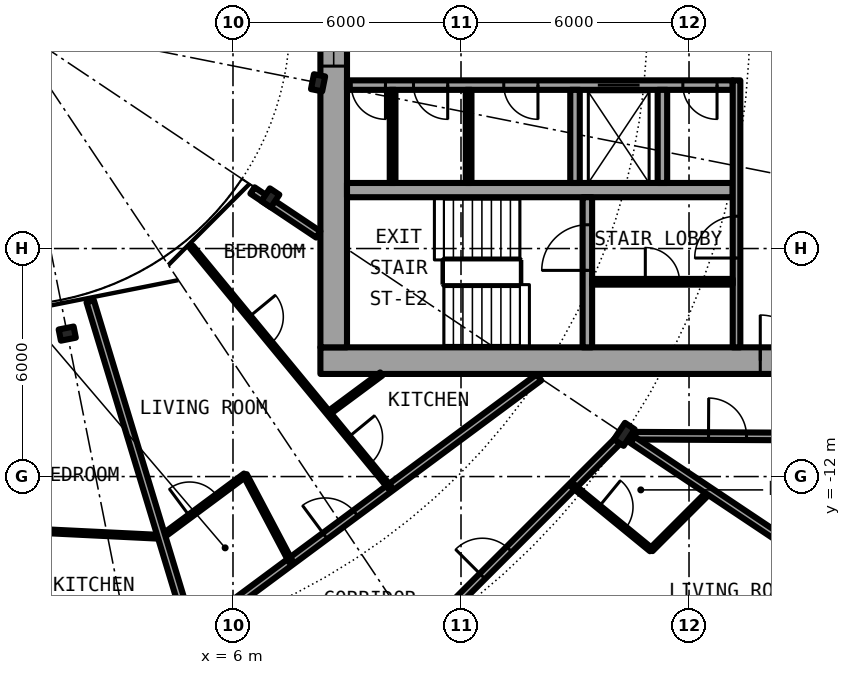
"""IFC4 building model, lengths in metres.
Left out: names, types, materials, properties, quantities, classifications, styles, units other than length and angle.
Written with IfcOpenShell. Run it as: python <this file> out.ifc"""

import sys

from ifc_helpers import new_model, si_unit, direction, frame, frame_2d, origin, origin_2d, place, context, subcontext, project, spatial, rectangle, i_section, extrude, element, fill, save


model = new_model("IFC4")
c1 = context("Model", 3, precision=1e-05, world=origin(), true_north=direction((0.0, 1.0)))
c2 = subcontext(c1, "Body", "Model", "MODEL_VIEW")
j1 = project(units=[si_unit("LENGTHUNIT", "METRE"), si_unit("PLANEANGLEUNIT", "RADIAN")], contexts=[c1])
p1 = place(None, origin())
s1 = spatial("IfcSite", under=j1, at=p1, CompositionType="ELEMENT")
p2 = place(p1, origin())
s2 = spatial("IfcBuilding", under=s1, at=p2, CompositionType="ELEMENT")
p3 = place(p2, frame((0.0, 0.0, 72.75)))
s3 = spatial("IfcBuildingStorey", under=s2, at=p3, CompositionType="ELEMENT", Elevation=72.75)
p4 = place(p3, frame((16.297, -10.889, 0.0), z_axis=(0.0, 0.0, 1.0), x_axis=(0.831469612303, -0.55557023302, 0.0)))
e1 = element("IfcColumn", 1, at=p4, inside=s3, PredefinedType="COLUMN", context=c2, shape_type="SweptSolid", body=[
    extrude(i_section(OverallWidth=0.306, OverallDepth=0.524, WebThickness=0.021, FlangeThickness=0.04, FilletRadius=0.027, at=origin_2d()), origin(), (0.0, 0.0, 1.0), 3.05),
])
for number, where, z_axis, x_axis in (
    (2, (1.639, -8.239, 0.0), (0.0, 0.0, 1.0), (0.195, -0.981, 0.0)),
    (3, (6.984, -4.667, 0.0), (0.0, 0.0, 1.0), (0.831, -0.556, 0.0)),
    (4, (8.239, -1.639, 0.0), (0.0, 0.0, 1.0), (0.981, -0.195, 0.0)),
):
    element("IfcColumn", number, at=place(p3, frame(where, z_axis=z_axis, x_axis=x_axis)), inside=s3, PredefinedType="COLUMN", context=c2, shape_type="SweptSolid", body=[
        extrude(i_section(OverallWidth=0.3, OverallDepth=0.4, WebThickness=0.013, FlangeThickness=0.024, FilletRadius=0.027, at=origin_2d()), origin(), (0.0, 0.0, 1.0), 3.05),
    ])
p5 = place(p3, frame((19.304, -19.304, 0.0), z_axis=(0.0, 0.0, 1.0), x_axis=(0.634382322723, 0.773019449054, 0.0)))
e5 = element("IfcWall", 5, at=p5, inside=s3, PredefinedType="SOLIDWALL", context=c2, shape_type="SweptSolid", body=[
    extrude(rectangle(XDim=5.352, YDim=0.25, at=frame_2d((2.676, 0.0))), origin(), (0.0, 0.0, 1.0), 2.7),
])
p6 = place(p5, frame((0.441, 0.0, 0.3)))
e6 = element("IfcOpeningElement", 6, at=p6, cuts=e5, PredefinedType="OPENING", context=c2, shape_type="SweptSolid", body=[
    extrude(rectangle(XDim=1.8, YDim=2.1, at=frame_2d((0.9, 1.05))), frame((0.0, 0.135, 0.0), z_axis=(0.0, -1.0, 0.0), x_axis=(1.0, 0.0, 0.0)), (0.0, 0.0, 1.0), 0.27),
])
p7 = place(p5, frame((3.51, 0.0, 0.0)))
e7 = element("IfcOpeningElement", 7, at=p7, cuts=e5, PredefinedType="OPENING", context=c2, shape_type="SweptSolid", body=[
    extrude(rectangle(XDim=1.0, YDim=2.2, at=frame_2d((0.5, 1.1))), frame((0.0, 0.135, 0.0), z_axis=(0.0, -1.0, 0.0), x_axis=(1.0, 0.0, 0.0)), (0.0, 0.0, 1.0), 0.27),
])
p8 = place(p3, frame((8.3, -8.95, 0.0), z_axis=(0.0, 0.0, 1.0), x_axis=(1.0, 0.0, 0.0)))
e8 = element("IfcWall", 8, at=p8, inside=s3, PredefinedType="SHEAR", context=c2, shape_type="SweptSolid", body=[
    extrude(rectangle(XDim=14.0, YDim=0.7, at=frame_2d((7.0, 0.0))), origin(), (0.0, 0.0, 1.0), 3.05),
])
p9 = place(p8, frame((11.575, 0.0, 0.0)))
e9 = element("IfcOpeningElement", 9, at=p9, cuts=e8, PredefinedType="OPENING", context=c2, shape_type="SweptSolid", body=[
    extrude(rectangle(XDim=1.2, YDim=2.3, at=frame_2d((0.6, 1.15))), frame((0.0, 0.36, 0.0), z_axis=(0.0, -1.0, 0.0), x_axis=(1.0, 0.0, 0.0)), (0.0, 0.0, 1.0), 0.72),
])
p10 = place(p3, frame((8.65, -8.6, 0.0), z_axis=(0.0, 0.0, 1.0), x_axis=(0.0, 1.0, 0.0)))
e10 = element("IfcWall", 10, at=p10, inside=s3, PredefinedType="SHEAR", context=c2, shape_type="SweptSolid", body=[
    extrude(rectangle(XDim=17.2, YDim=0.7, at=frame_2d((8.6, 0.0))), origin(), (0.0, 0.0, 1.0), 3.05),
])
p11 = place(p10, frame((7.4, 0.0, 0.1)))
e11 = element("IfcOpeningElement", 11, at=p11, cuts=e10, PredefinedType="OPENING", context=c2, shape_type="SweptSolid", body=[
    extrude(rectangle(XDim=2.4, YDim=2.2, at=frame_2d((1.2, 1.1))), frame((0.0, 0.36, 0.0), z_axis=(0.0, -1.0, 0.0), x_axis=(1.0, 0.0, 0.0)), (0.0, 0.0, 1.0), 0.72),
])
p12 = place(p3, frame((19.15, -1.7, 0.0), z_axis=(0.0, 0.0, 1.0), x_axis=(-1.0, 0.0, 0.0)))
e12 = element("IfcWall", 12, at=p12, inside=s3, PredefinedType="SHEAR", context=c2, shape_type="SweptSolid", body=[
    extrude(rectangle(XDim=10.15, YDim=0.25, at=frame_2d((5.075, 0.0))), origin(), (0.0, 0.0, 1.0), 3.05),
])
p13 = place(p12, frame((2.45, 0.0, 0.0)))
e13 = element("IfcOpeningElement", 13, at=p13, cuts=e12, PredefinedType="OPENING", context=c2, shape_type="SweptSolid", body=[
    extrude(rectangle(XDim=1.1, YDim=2.3, at=frame_2d((0.55, 1.15))), frame((0.0, 0.135, 0.0), z_axis=(0.0, -1.0, 0.0), x_axis=(1.0, 0.0, 0.0)), (0.0, 0.0, 1.0), 0.27),
])
p14 = place(p12, frame((9.137, 0.0, 0.0)))
e14 = element("IfcOpeningElement", 14, at=p14, cuts=e12, PredefinedType="OPENING", context=c2, shape_type="SweptSolid", body=[
    extrude(rectangle(XDim=0.9, YDim=2.3, at=frame_2d((0.45, 1.15))), frame((0.0, 0.135, 0.0), z_axis=(0.0, -1.0, 0.0), x_axis=(1.0, 0.0, 0.0)), (0.0, 0.0, 1.0), 0.27),
])
p15 = place(p12, frame((7.5, 0.0, 0.0)))
e15 = element("IfcOpeningElement", 15, at=p15, cuts=e12, PredefinedType="OPENING", context=c2, shape_type="SweptSolid", body=[
    extrude(rectangle(XDim=0.9, YDim=2.3, at=frame_2d((0.45, 1.15))), frame((0.0, 0.135, 0.0), z_axis=(0.0, -1.0, 0.0), x_axis=(1.0, 0.0, 0.0)), (0.0, 0.0, 1.0), 0.27),
])
p16 = place(p12, frame((5.125, 0.0, 0.0)))
e16 = element("IfcOpeningElement", 16, at=p16, cuts=e12, PredefinedType="OPENING", context=c2, shape_type="SweptSolid", body=[
    extrude(rectangle(XDim=0.9, YDim=2.3, at=frame_2d((0.45, 1.15))), frame((0.0, 0.135, 0.0), z_axis=(0.0, -1.0, 0.0), x_axis=(1.0, 0.0, 0.0)), (0.0, 0.0, 1.0), 0.27),
])
p17 = place(p12, frame((0.413, 0.0, 0.0)))
e17 = element("IfcOpeningElement", 17, at=p17, cuts=e12, PredefinedType="OPENING", context=c2, shape_type="SweptSolid", body=[
    extrude(rectangle(XDim=0.9, YDim=2.3, at=frame_2d((0.45, 1.15))), frame((0.0, 0.135, 0.0), z_axis=(0.0, -1.0, 0.0), x_axis=(1.0, 0.0, 0.0)), (0.0, 0.0, 1.0), 0.27),
])
p18 = place(p3, frame((9.0, -4.462, 0.0), z_axis=(0.0, 0.0, 1.0), x_axis=(1.0, 0.0, 0.0)))
e18 = element("IfcWall", 18, at=p18, inside=s3, PredefinedType="SHEAR", context=c2, shape_type="SweptSolid", body=[
    extrude(rectangle(XDim=10.15, YDim=0.375, at=frame_2d((5.075, 0.0))), origin(), (0.0, 0.0, 1.0), 3.05),
])
p19 = place(p3, frame((15.325, -8.6, 0.0), z_axis=(0.0, 0.0, 1.0), x_axis=(0.0, 1.0, 0.0)))
e19 = element("IfcWall", 19, at=p19, inside=s3, PredefinedType="SHEAR", context=c2, shape_type="SweptSolid", body=[
    extrude(rectangle(XDim=3.95, YDim=0.25, at=frame_2d((1.975, 0.0))), origin(), (0.0, 0.0, 1.0), 3.05),
])
p20 = place(p19, frame((2.025, 0.0, 0.0)))
e20 = element("IfcOpeningElement", 20, at=p20, cuts=e19, PredefinedType="OPENING", context=c2, shape_type="SweptSolid", body=[
    extrude(rectangle(XDim=1.2, YDim=2.3, at=frame_2d((0.6, 1.15))), frame((0.0, 0.135, 0.0), z_axis=(0.0, -1.0, 0.0), x_axis=(1.0, 0.0, 0.0)), (0.0, 0.0, 1.0), 0.27),
])
for number, where, z_axis, x_axis in (
    (21, (15.0, -1.825, 0.0), (0.0, 0.0, 1.0), (0.0, -1.0, 0.0)),
    (22, (17.3, -1.825, 0.0), (0.0, 0.0, 1.0), (0.0, -1.0, 0.0)),
):
    element("IfcWall", number, at=place(p3, frame(where, z_axis=z_axis, x_axis=x_axis)), inside=s3, PredefinedType="SOLIDWALL", context=c2, shape_type="SweptSolid", body=[
        extrude(rectangle(XDim=2.45, YDim=0.25, at=frame_2d((1.225, 0.0))), origin(), (0.0, 0.0, 1.0), 2.7),
    ])
p21 = place(p3, frame((19.25, -8.6, 0.0), z_axis=(0.0, 0.0, 1.0), x_axis=(0.0, 1.0, 0.0)))
e23 = element("IfcWall", 23, at=p21, inside=s3, PredefinedType="SOLIDWALL", context=c2, shape_type="SweptSolid", body=[
    extrude(rectangle(XDim=7.025, YDim=0.2, at=frame_2d((3.513, 0.0))), origin(), (0.0, 0.0, 1.0), 2.7),
])
p22 = place(p21, frame((2.35, 0.0, 0.0)))
e24 = element("IfcOpeningElement", 24, at=p22, cuts=e23, PredefinedType="OPENING", context=c2, shape_type="SweptSolid", body=[
    extrude(rectangle(XDim=1.1, YDim=2.3, at=frame_2d((0.55, 1.15))), frame((0.0, 0.11, 0.0), z_axis=(0.0, -1.0, 0.0), x_axis=(1.0, 0.0, 0.0)), (0.0, 0.0, 1.0), 0.22),
])
for number, where, z_axis, x_axis in (
    (25, (10.2, -1.825, 0.0), (0.0, 0.0, 1.0), (0.0, -1.0, 0.0)),
    (26, (12.2, -1.825, 0.0), (0.0, 0.0, 1.0), (0.0, -1.0, 0.0)),
):
    element("IfcWall", number, at=place(p3, frame(where, z_axis=z_axis, x_axis=x_axis)), inside=s3, PredefinedType="PARTITIONING", context=c2, shape_type="SweptSolid", body=[
        extrude(rectangle(XDim=2.45, YDim=0.15, at=frame_2d((1.225, 0.0))), origin(), (0.0, 0.0, 1.0), 2.7),
    ])
p23 = place(p3, frame((15.45, -6.875, 0.0), z_axis=(0.0, 0.0, 1.0), x_axis=(1.0, 0.0, 0.0)))
e27 = element("IfcWall", 27, at=p23, inside=s3, PredefinedType="PARTITIONING", context=c2, shape_type="SweptSolid", body=[
    extrude(rectangle(XDim=3.7, YDim=0.15, at=frame_2d((1.85, 0.0))), origin(), (0.0, 0.0, 1.0), 2.7),
])
p24 = place(p23, frame((1.4, 0.0, 0.0)))
e28 = element("IfcOpeningElement", 28, at=p24, cuts=e27, PredefinedType="OPENING", context=c2, shape_type="SweptSolid", body=[
    extrude(rectangle(XDim=0.9, YDim=2.3, at=frame_2d((0.45, 1.15))), frame((0.0, 0.085, 0.0), z_axis=(0.0, -1.0, 0.0), x_axis=(1.0, 0.0, 0.0)), (0.0, 0.0, 1.0), 0.17),
])
p25 = place(p3, frame((17.004, -13.927, 0.0), z_axis=(0.0, 0.0, 1.0), x_axis=(0.707106781187, 0.707106781187, 0.0)))
e29 = element("IfcWall", 29, at=p25, inside=s3, PredefinedType="PARTITIONING", context=c2, shape_type="SweptSolid", body=[
    extrude(rectangle(XDim=2.175, YDim=0.1, at=frame_2d((1.088, 0.0))), origin(), (0.0, 0.0, 1.0), 2.7),
])
p26 = place(p3, frame((11.0, -16.186, 0.0), z_axis=(0.0, 0.0, 1.0), x_axis=(0.707106781187, 0.707106781187, 0.0)))
e30 = element("IfcWall", 30, at=p26, inside=s3, PredefinedType="PARTITIONING", context=c2, shape_type="SweptSolid", body=[
    extrude(rectangle(XDim=7.334, YDim=0.2, at=frame_2d((3.667, 0.0))), origin(), (0.0, 0.0, 1.0), 2.38),
])
p27 = place(p26, frame((2.211, 0.0, 0.0)))
e31 = element("IfcOpeningElement", 31, at=p27, cuts=e30, PredefinedType="OPENING", context=c2, shape_type="SweptSolid", body=[
    extrude(rectangle(XDim=1.0, YDim=2.3, at=frame_2d((0.5, 1.15))), frame((0.0, 0.11, 0.0), z_axis=(0.0, -1.0, 0.0), x_axis=(1.0, 0.0, 0.0)), (0.0, 0.0, 1.0), 0.22),
])
p28 = place(p3, frame((4.906, -16.172, 0.0), z_axis=(0.0, 0.0, 1.0), x_axis=(0.803204584823, 0.59570327758, 0.0)))
e32 = element("IfcWall", 32, at=p28, inside=s3, PredefinedType="PARTITIONING", context=c2, shape_type="SweptSolid", body=[
    extrude(rectangle(XDim=11.387, YDim=0.2, at=frame_2d((5.693, 0.0))), origin(), (0.0, 0.0, 1.0), 2.7),
])
p29 = place(p28, frame((4.38, 0.0, 0.0)))
e33 = element("IfcOpeningElement", 33, at=p29, cuts=e32, PredefinedType="OPENING", context=c2, shape_type="SweptSolid", body=[
    extrude(rectangle(XDim=1.0, YDim=2.3, at=frame_2d((0.5, 1.15))), frame((0.0, 0.11, 0.0), z_axis=(0.0, -1.0, 0.0), x_axis=(1.0, 0.0, 0.0)), (0.0, 0.0, 1.0), 0.22),
])
p30 = place(p3, frame((0.03, -13.387, 0.0), z_axis=(0.0, 0.0, 1.0), x_axis=(0.998798386358, -0.049007993321, 0.0)))
e34 = element("IfcWall", 34, at=p30, inside=s3, PredefinedType="PARTITIONING", context=c2, shape_type="SweptSolid", body=[
    extrude(rectangle(XDim=4.1, YDim=0.1, at=frame_2d((2.05, 0.0))), origin(), (0.0, 0.0, 1.0), 2.7),
])
p31 = place(p3, frame((4.123, -13.589, 0.0), z_axis=(0.0, 0.0, 1.0), x_axis=(0.803128348509, 0.595806055542, 0.0)))
e35 = element("IfcWall", 35, at=p31, inside=s3, PredefinedType="PARTITIONING", context=c2, shape_type="SweptSolid", body=[
    extrude(rectangle(XDim=2.734, YDim=0.1, at=frame_2d((1.367, 0.0))), origin(), (0.0, 0.0, 1.0), 2.7),
])
p32 = place(p31, frame((0.916, 0.0, 0.0)))
e36 = element("IfcOpeningElement", 36, at=p32, cuts=e35, PredefinedType="OPENING", context=c2, shape_type="SweptSolid", body=[
    extrude(rectangle(XDim=0.9, YDim=2.3, at=frame_2d((0.45, 1.15))), frame((0.0, 0.06, 0.0), z_axis=(0.0, -1.0, 0.0), x_axis=(1.0, 0.0, 0.0)), (0.0, 0.0, 1.0), 0.12),
])
p33 = place(p3, frame((8.513, -10.332, 0.0), z_axis=(0.0, 0.0, 1.0), x_axis=(0.803135014325, 0.595797070121, 0.0)))
e37 = element("IfcWall", 37, at=p33, inside=s3, PredefinedType="PARTITIONING", context=c2, shape_type="SweptSolid", body=[
    extrude(rectangle(XDim=1.732, YDim=0.1, at=frame_2d((0.866, 0.0))), origin(), (0.0, 0.0, 1.0), 2.7),
])
p34 = place(p3, frame((16.588, -10.925, 0.0), z_axis=(0.0, 0.0, 1.0), x_axis=(0.999988019025, -0.004895079807, 0.0)))
e38 = element("IfcWall", 38, at=p34, inside=s3, PredefinedType="PARTITIONING", context=c2, shape_type="SweptSolid", body=[
    extrude(rectangle(XDim=5.087, YDim=0.2, at=frame_2d((2.543, 0.0))), origin(), (0.0, 0.0, 1.0), 2.7),
])
p35 = place(p34, frame((1.925, 0.0, 0.0)))
e39 = element("IfcOpeningElement", 39, at=p35, cuts=e38, PredefinedType="OPENING", context=c2, shape_type="SweptSolid", body=[
    extrude(rectangle(XDim=1.0, YDim=2.3, at=frame_2d((0.5, 1.15))), frame((0.0, 0.11, 0.0), z_axis=(0.0, -1.0, 0.0), x_axis=(1.0, 0.0, 0.0)), (0.0, 0.0, 1.0), 0.22),
])
p36 = place(p3, frame((6.513, -4.472, 0.0), z_axis=(0.0, 0.0, 1.0), x_axis=(0.831382204863, -0.555701025225, 0.0)))
e40 = element("IfcWall", 40, at=p36, inside=s3, PredefinedType="PARTITIONING", context=c2, shape_type="SweptSolid", body=[
    extrude(rectangle(XDim=2.082, YDim=0.2, at=frame_2d((1.041, 0.0))), origin(), (0.0, 0.0, 1.0), 2.7),
])
p37 = place(p3, frame((2.242, -7.388, 0.0), z_axis=(0.0, 0.0, 1.0), x_axis=(0.290225889812, -0.956958166736, 0.0)))
e41 = element("IfcWall", 41, at=p37, inside=s3, PredefinedType="PARTITIONING", context=c2, shape_type="SweptSolid", body=[
    extrude(rectangle(XDim=9.179, YDim=0.2, at=frame_2d((4.59, 0.0))), origin(), (0.0, 0.0, 1.0), 2.7),
])
p38 = place(p3, frame((4.908, -5.959, 0.0), z_axis=(0.0, 0.0, 1.0), x_axis=(0.636105207978, -0.771602335652, 0.0)))
e42 = element("IfcWall", 42, at=p38, inside=s3, PredefinedType="PARTITIONING", context=c2, shape_type="SweptSolid", body=[
    extrude(rectangle(XDim=8.213, YDim=0.1, at=frame_2d((4.106, 0.0))), origin(), (0.0, 0.0, 1.0), 2.7),
])
p39 = place(p38, frame((6.49, 0.0, 0.0)))
e43 = element("IfcOpeningElement", 43, at=p39, cuts=e42, PredefinedType="OPENING", context=c2, shape_type="SweptSolid", body=[
    extrude(rectangle(XDim=0.9, YDim=2.3, at=frame_2d((0.45, 1.15))), frame((0.0, 0.06, 0.0), z_axis=(0.0, -1.0, 0.0), x_axis=(1.0, 0.0, 0.0)), (0.0, 0.0, 1.0), 0.12),
])
p40 = place(p38, frame((2.384, 0.0, 0.0)))
e44 = element("IfcOpeningElement", 44, at=p40, cuts=e42, PredefinedType="OPENING", context=c2, shape_type="SweptSolid", body=[
    extrude(rectangle(XDim=0.9, YDim=2.3, at=frame_2d((0.45, 1.15))), frame((0.0, 0.06, 0.0), z_axis=(0.0, -1.0, 0.0), x_axis=(1.0, 0.0, 0.0)), (0.0, 0.0, 1.0), 0.12),
])
p41 = place(p3, frame((6.318, -11.96, 0.0), z_axis=(0.0, 0.0, 1.0), x_axis=(0.467001992543, -0.884256263173, 0.0)))
e45 = element("IfcWall", 45, at=p41, inside=s3, PredefinedType="PARTITIONING", context=c2, shape_type="SweptSolid", body=[
    extrude(rectangle(XDim=2.572, YDim=0.1, at=frame_2d((1.286, 0.0))), origin(), (0.0, 0.0, 1.0), 2.7),
])
p42 = place(p3, frame((14.945, -12.241, 0.0), z_axis=(0.0, 0.0, 1.0), x_axis=(0.77367517848, -0.633582447834, 0.0)))
e46 = element("IfcWall", 46, at=p42, inside=s3, PredefinedType="PARTITIONING", context=c2, shape_type="SweptSolid", body=[
    extrude(rectangle(XDim=2.661, YDim=0.1, at=frame_2d((1.331, 0.0))), origin(), (0.0, 0.0, 1.0), 2.7),
])
p43 = place(p42, frame((0.881, 0.0, 0.0)))
e47 = element("IfcOpeningElement", 47, at=p43, cuts=e46, PredefinedType="OPENING", context=c2, shape_type="SweptSolid", body=[
    extrude(rectangle(XDim=0.9, YDim=2.3, at=frame_2d((0.45, 1.15))), frame((0.0, 0.06, 0.0), z_axis=(0.0, -1.0, 0.0), x_axis=(1.0, 0.0, 0.0)), (0.0, 0.0, 1.0), 0.12),
])
p44 = place(p3, frame((16.515, -11.035, 0.0), z_axis=(0.0, 0.0, 1.0), x_axis=(0.831505405283, -0.555516661303, 0.0)))
e48 = element("IfcWall", 48, at=p44, inside=s3, PredefinedType="PARTITIONING", context=c2, shape_type="SweptSolid", body=[
    extrude(rectangle(XDim=7.312, YDim=0.2, at=frame_2d((3.656, 0.0))), origin(), (0.0, 0.0, 1.0), 2.7),
])
p45 = place(p13, origin())
e49 = element("IfcDoor", 49, at=p45, inside=s3, OperationType="DOUBLE_DOOR_SLIDING", PredefinedType="DOOR", context=c2, shape_type="SweptSolid", body=[
    extrude(rectangle(XDim=1.1, YDim=2.3, at=frame_2d((0.55, 1.15))), frame((0.0, 0.025, 0.0), z_axis=(0.0, -1.0, 0.0), x_axis=(1.0, 0.0, 0.0)), (0.0, 0.0, 1.0), 0.05),
])
fill(e13, e49)
p46 = place(p14, origin())
e50 = element("IfcDoor", 50, at=p46, inside=s3, OperationType="SINGLE_SWING_LEFT", PredefinedType="DOOR", context=c2, shape_type="SweptSolid", body=[
    extrude(rectangle(XDim=0.9, YDim=2.3, at=frame_2d((0.45, 1.15))), frame((0.0, 0.025, 0.0), z_axis=(0.0, -1.0, 0.0), x_axis=(1.0, 0.0, 0.0)), (0.0, 0.0, 1.0), 0.05),
])
fill(e14, e50)
p47 = place(p15, origin())
e51 = element("IfcDoor", 51, at=p47, inside=s3, OperationType="SINGLE_SWING_LEFT", PredefinedType="DOOR", context=c2, shape_type="SweptSolid", body=[
    extrude(rectangle(XDim=0.9, YDim=2.3, at=frame_2d((0.45, 1.15))), frame((0.0, 0.025, 0.0), z_axis=(0.0, -1.0, 0.0), x_axis=(1.0, 0.0, 0.0)), (0.0, 0.0, 1.0), 0.05),
])
fill(e15, e51)
p48 = place(p16, origin())
e52 = element("IfcDoor", 52, at=p48, inside=s3, OperationType="SINGLE_SWING_LEFT", PredefinedType="DOOR", context=c2, shape_type="SweptSolid", body=[
    extrude(rectangle(XDim=0.9, YDim=2.3, at=frame_2d((0.45, 1.15))), frame((0.0, 0.025, 0.0), z_axis=(0.0, -1.0, 0.0), x_axis=(1.0, 0.0, 0.0)), (0.0, 0.0, 1.0), 0.05),
])
fill(e16, e52)
p49 = place(p17, origin())
e53 = element("IfcDoor", 53, at=p49, inside=s3, OperationType="SINGLE_SWING_RIGHT", PredefinedType="DOOR", context=c2, shape_type="SweptSolid", body=[
    extrude(rectangle(XDim=0.9, YDim=2.3, at=frame_2d((0.45, 1.15))), frame((0.0, 0.025, 0.0), z_axis=(0.0, -1.0, 0.0), x_axis=(1.0, 0.0, 0.0)), (0.0, 0.0, 1.0), 0.05),
])
fill(e17, e53)
p50 = place(p24, origin())
e54 = element("IfcDoor", 54, at=p50, inside=s3, OperationType="SINGLE_SWING_LEFT", PredefinedType="DOOR", context=c2, shape_type="SweptSolid", body=[
    extrude(rectangle(XDim=0.9, YDim=2.3, at=frame_2d((0.45, 1.15))), frame((0.0, 0.025, 0.0), z_axis=(0.0, -1.0, 0.0), x_axis=(1.0, 0.0, 0.0)), (0.0, 0.0, 1.0), 0.05),
])
fill(e28, e54)
p51 = place(p20, origin())
e55 = element("IfcDoor", 55, at=p51, inside=s3, OperationType="SINGLE_SWING_LEFT", PredefinedType="DOOR", context=c2, shape_type="SweptSolid", body=[
    extrude(rectangle(XDim=1.2, YDim=2.3, at=frame_2d((0.6, 1.15))), frame((0.0, 0.025, 0.0), z_axis=(0.0, -1.0, 0.0), x_axis=(1.0, 0.0, 0.0)), (0.0, 0.0, 1.0), 0.05),
])
fill(e20, e55)
p52 = place(p22, origin())
e56 = element("IfcDoor", 56, at=p52, inside=s3, OperationType="SINGLE_SWING_RIGHT", PredefinedType="DOOR", context=c2, shape_type="SweptSolid", body=[
    extrude(rectangle(XDim=1.1, YDim=2.3, at=frame_2d((0.55, 1.15))), frame((0.0, 0.025, 0.0), z_axis=(0.0, -1.0, 0.0), x_axis=(1.0, 0.0, 0.0)), (0.0, 0.0, 1.0), 0.05),
])
fill(e24, e56)
p53 = place(p9, origin())
e57 = element("IfcDoor", 57, at=p53, inside=s3, OperationType="SINGLE_SWING_LEFT", PredefinedType="DOOR", context=c2, shape_type="SweptSolid", body=[
    extrude(rectangle(XDim=1.2, YDim=2.3, at=frame_2d((0.6, 1.15))), frame((0.0, 0.025, 0.0), z_axis=(0.0, -1.0, 0.0), x_axis=(1.0, 0.0, 0.0)), (0.0, 0.0, 1.0), 0.05),
])
fill(e9, e57)
p54 = place(p11, origin())
e58 = element("IfcWindow", 58, at=p54, inside=s3, PartitioningType="SINGLE_PANEL", PredefinedType="WINDOW", context=c2, shape_type="SweptSolid", body=[
    extrude(rectangle(XDim=2.4, YDim=2.2, at=frame_2d((1.2, 1.1))), frame((0.0, 0.03, 0.0), z_axis=(0.0, -1.0, 0.0), x_axis=(1.0, 0.0, 0.0)), (0.0, 0.0, 1.0), 0.06),
])
fill(e11, e58)
p55 = place(p27, origin())
e59 = element("IfcDoor", 59, at=p55, inside=s3, OperationType="SINGLE_SWING_LEFT", PredefinedType="DOOR", context=c2, shape_type="SweptSolid", body=[
    extrude(rectangle(XDim=1.0, YDim=2.3, at=frame_2d((0.5, 1.15))), frame((0.0, 0.025, 0.0), z_axis=(0.0, -1.0, 0.0), x_axis=(1.0, 0.0, 0.0)), (0.0, 0.0, 1.0), 0.05),
])
fill(e31, e59)
p56 = place(p43, origin())
e60 = element("IfcDoor", 60, at=p56, inside=s3, OperationType="SINGLE_SWING_LEFT", PredefinedType="DOOR", context=c2, shape_type="SweptSolid", body=[
    extrude(rectangle(XDim=0.9, YDim=2.3, at=frame_2d((0.45, 1.15))), frame((0.0, 0.025, 0.0), z_axis=(0.0, -1.0, 0.0), x_axis=(1.0, 0.0, 0.0)), (0.0, 0.0, 1.0), 0.05),
])
fill(e47, e60)
p57 = place(p29, origin())
e61 = element("IfcDoor", 61, at=p57, inside=s3, OperationType="SINGLE_SWING_LEFT", PredefinedType="DOOR", context=c2, shape_type="SweptSolid", body=[
    extrude(rectangle(XDim=1.0, YDim=2.3, at=frame_2d((0.5, 1.15))), frame((0.0, 0.025, 0.0), z_axis=(0.0, -1.0, 0.0), x_axis=(1.0, 0.0, 0.0)), (0.0, 0.0, 1.0), 0.05),
])
fill(e33, e61)
p58 = place(p32, origin())
e62 = element("IfcDoor", 62, at=p58, inside=s3, OperationType="SINGLE_SWING_LEFT", PredefinedType="DOOR", context=c2, shape_type="SweptSolid", body=[
    extrude(rectangle(XDim=0.9, YDim=2.3, at=frame_2d((0.45, 1.15))), frame((0.0, 0.025, 0.0), z_axis=(0.0, -1.0, 0.0), x_axis=(1.0, 0.0, 0.0)), (0.0, 0.0, 1.0), 0.05),
])
fill(e36, e62)
p59 = place(p39, origin())
e63 = element("IfcDoor", 63, at=p59, inside=s3, OperationType="SINGLE_SWING_RIGHT", PredefinedType="DOOR", context=c2, shape_type="SweptSolid", body=[
    extrude(rectangle(XDim=0.9, YDim=2.3, at=frame_2d((0.45, 1.15))), frame((0.0, 0.025, 0.0), z_axis=(0.0, -1.0, 0.0), x_axis=(1.0, 0.0, 0.0)), (0.0, 0.0, 1.0), 0.05),
])
fill(e43, e63)
p60 = place(p40, origin())
e64 = element("IfcDoor", 64, at=p60, inside=s3, OperationType="SINGLE_SWING_LEFT", PredefinedType="DOOR", context=c2, shape_type="SweptSolid", body=[
    extrude(rectangle(XDim=0.9, YDim=2.3, at=frame_2d((0.45, 1.15))), frame((0.0, 0.025, 0.0), z_axis=(0.0, -1.0, 0.0), x_axis=(1.0, 0.0, 0.0)), (0.0, 0.0, 1.0), 0.05),
])
fill(e44, e64)
p61 = place(p35, origin())
e65 = element("IfcDoor", 65, at=p61, inside=s3, OperationType="SINGLE_SWING_LEFT", PredefinedType="DOOR", context=c2, shape_type="SweptSolid", body=[
    extrude(rectangle(XDim=1.0, YDim=2.3, at=frame_2d((0.5, 1.15))), frame((0.0, 0.025, 0.0), z_axis=(0.0, -1.0, 0.0), x_axis=(1.0, 0.0, 0.0)), (0.0, 0.0, 1.0), 0.05),
])
fill(e39, e65)
save(model, sys.argv[1])
